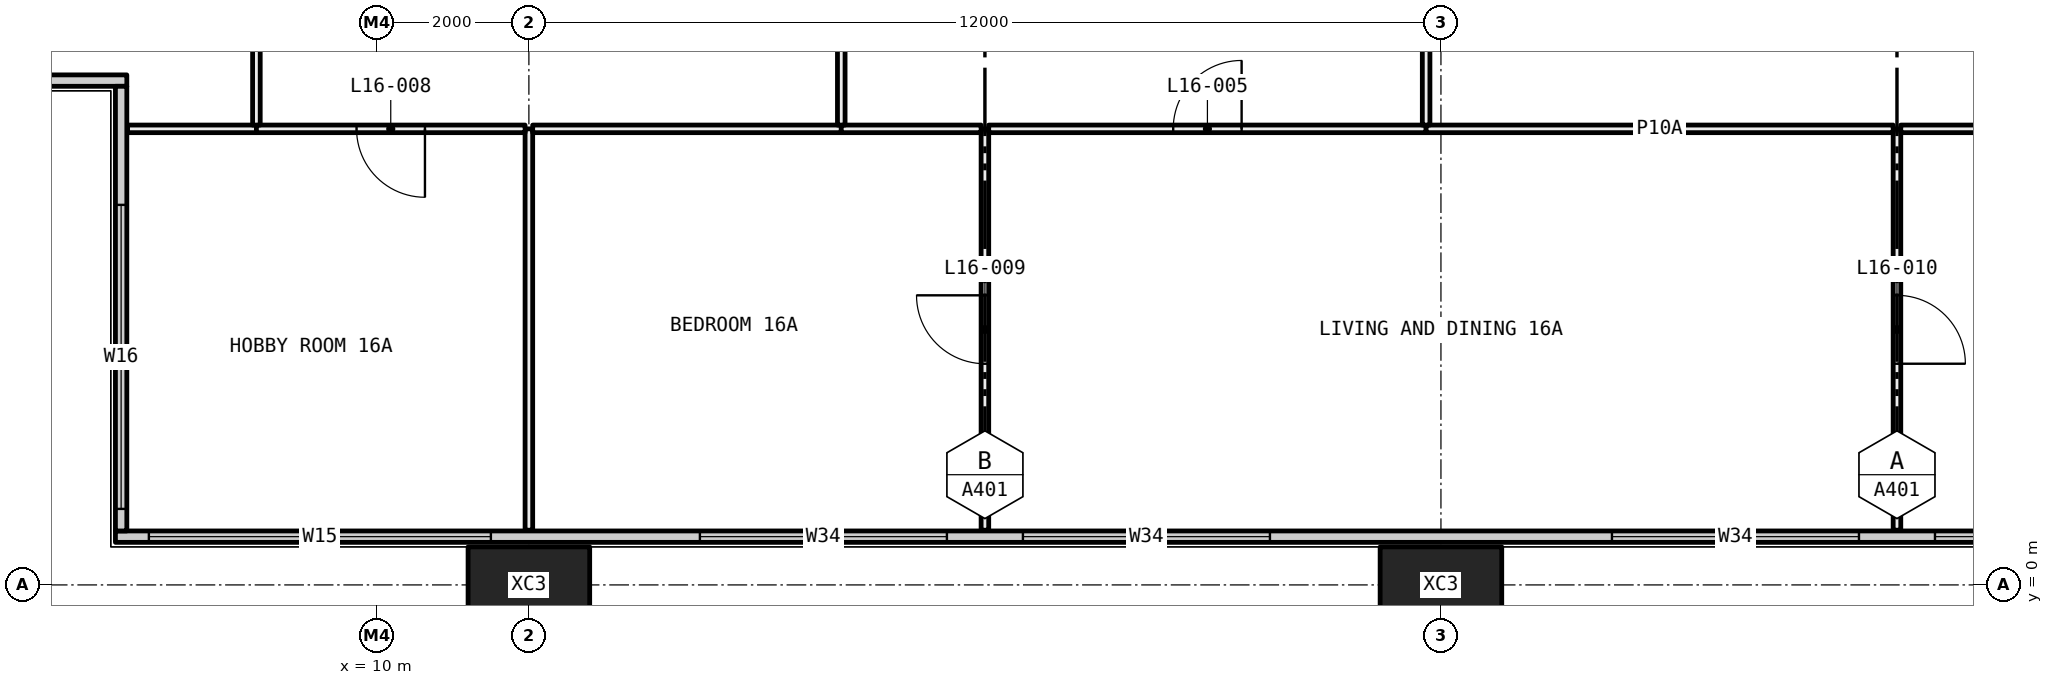
"""IFC4 building model, lengths in metres.
Left out: names, types, materials, properties, quantities, classifications, styles, units other than length and angle.
Written with IfcOpenShell. Run it as: python <this file> out.ifc"""

import sys

from ifc_helpers import new_model, si_unit, direction, frame, frame_2d, origin, origin_2d, place, context, subcontext, project, spatial, rectangle, hollow_rectangle, extrude, element, fill, save


model = new_model("IFC4")
c1 = context("Model", 3, precision=1e-05, world=origin(), true_north=direction((0.0, 1.0)))
c2 = subcontext(c1, "Body", "Model", "MODEL_VIEW")
j1 = project(units=[si_unit("LENGTHUNIT", "METRE"), si_unit("PLANEANGLEUNIT", "RADIAN")], contexts=[c1])
p1 = place(None, origin())
s1 = spatial("IfcSite", under=j1, at=p1, CompositionType="ELEMENT")
p2 = place(p1, origin())
s2 = spatial("IfcBuilding", under=s1, at=p2, CompositionType="ELEMENT")
p3 = place(p2, frame((0.0, 0.0, 67.95)))
s3 = spatial("IfcBuildingStorey", under=s2, at=p3, CompositionType="ELEMENT", Elevation=67.95)
for number, where, z_axis, x_axis in (
    (1, (12.0, 0.0, -0.4), (0.0, 0.0, 1.0), (1.0, 0.0, 0.0)),
    (2, (24.0, 0.0, -0.4), (0.0, 0.0, 1.0), (1.0, 0.0, 0.0)),
):
    element("IfcColumn", number, at=place(p3, frame(where, z_axis=z_axis, x_axis=x_axis)), inside=s3, PredefinedType="COLUMN", context=c2, shape_type="SweptSolid", body=[
        extrude(hollow_rectangle(XDim=1.6, YDim=1.0, WallThickness=0.065, at=origin_2d()), origin(), (0.0, 0.0, 1.0), 3.45),
    ])
p4 = place(p3, frame((6.56, 0.635, 0.0), z_axis=(0.0, 0.0, 1.0), x_axis=(1.0, 0.0, 0.0)))
e3 = element("IfcWall", 3, at=p4, inside=s3, PredefinedType="ELEMENTEDWALL", context=c2, shape_type="SweptSolid", body=[
    extrude(rectangle(XDim=58.88, YDim=0.15, at=frame_2d((29.44, 0.0))), origin(), (0.0, 0.0, 1.0), 3.05),
])
p5 = place(p4, frame((0.44, 0.0, 0.45)))
e4 = element("IfcOpeningElement", 4, at=p5, cuts=e3, PredefinedType="OPENING", context=c2, shape_type="SweptSolid", body=[
    extrude(rectangle(XDim=4.5, YDim=2.55, at=frame_2d((2.25, 1.275))), frame((0.0, 0.085, 0.0), z_axis=(0.0, -1.0, 0.0), x_axis=(1.0, 0.0, 0.0)), (0.0, 0.0, 1.0), 0.17),
])
p6 = place(p4, frame((7.69, 0.0, 0.45)))
e5 = element("IfcOpeningElement", 5, at=p6, cuts=e3, PredefinedType="OPENING", context=c2, shape_type="SweptSolid", body=[
    extrude(rectangle(XDim=3.25, YDim=2.55, at=frame_2d((1.625, 1.275))), frame((0.0, 0.085, 0.0), z_axis=(0.0, -1.0, 0.0), x_axis=(1.0, 0.0, 0.0)), (0.0, 0.0, 1.0), 0.17),
])
p7 = place(p4, frame((11.94, 0.0, 0.45)))
e6 = element("IfcOpeningElement", 6, at=p7, cuts=e3, PredefinedType="OPENING", context=c2, shape_type="SweptSolid", body=[
    extrude(rectangle(XDim=3.25, YDim=2.55, at=frame_2d((1.625, 1.275))), frame((0.0, 0.085, 0.0), z_axis=(0.0, -1.0, 0.0), x_axis=(1.0, 0.0, 0.0)), (0.0, 0.0, 1.0), 0.17),
])
p8 = place(p4, frame((19.69, 0.0, 0.45)))
e7 = element("IfcOpeningElement", 7, at=p8, cuts=e3, PredefinedType="OPENING", context=c2, shape_type="SweptSolid", body=[
    extrude(rectangle(XDim=3.25, YDim=2.55, at=frame_2d((1.625, 1.275))), frame((0.0, 0.085, 0.0), z_axis=(0.0, -1.0, 0.0), x_axis=(1.0, 0.0, 0.0)), (0.0, 0.0, 1.0), 0.17),
])
p9 = place(p4, frame((23.94, 0.0, 0.45)))
e8 = element("IfcOpeningElement", 8, at=p9, cuts=e3, PredefinedType="OPENING", context=c2, shape_type="SweptSolid", body=[
    extrude(rectangle(XDim=2.0, YDim=2.55, at=frame_2d((1.0, 1.275))), frame((0.0, 0.085, 0.0), z_axis=(0.0, -1.0, 0.0), x_axis=(1.0, 0.0, 0.0)), (0.0, 0.0, 1.0), 0.17),
])
p10 = place(p4, frame((31.69, 0.0, 0.45)))
e9 = element("IfcOpeningElement", 9, at=p10, cuts=e3, PredefinedType="OPENING", context=c2, shape_type="SweptSolid", body=[
    extrude(rectangle(XDim=3.25, YDim=2.55, at=frame_2d((1.625, 1.275))), frame((0.0, 0.085, 0.0), z_axis=(0.0, -1.0, 0.0), x_axis=(1.0, 0.0, 0.0)), (0.0, 0.0, 1.0), 0.17),
])
p11 = place(p4, frame((35.94, 0.0, 0.45)))
e10 = element("IfcOpeningElement", 10, at=p11, cuts=e3, PredefinedType="OPENING", context=c2, shape_type="SweptSolid", body=[
    extrude(rectangle(XDim=3.25, YDim=2.55, at=frame_2d((1.625, 1.275))), frame((0.0, 0.085, 0.0), z_axis=(0.0, -1.0, 0.0), x_axis=(1.0, 0.0, 0.0)), (0.0, 0.0, 1.0), 0.17),
])
p12 = place(p4, frame((43.69, 0.0, 0.45)))
e11 = element("IfcOpeningElement", 11, at=p12, cuts=e3, PredefinedType="OPENING", context=c2, shape_type="SweptSolid", body=[
    extrude(rectangle(XDim=3.25, YDim=2.55, at=frame_2d((1.625, 1.275))), frame((0.0, 0.085, 0.0), z_axis=(0.0, -1.0, 0.0), x_axis=(1.0, 0.0, 0.0)), (0.0, 0.0, 1.0), 0.17),
])
p13 = place(p4, frame((47.94, 0.0, 0.45)))
e12 = element("IfcOpeningElement", 12, at=p13, cuts=e3, PredefinedType="OPENING", context=c2, shape_type="SweptSolid", body=[
    extrude(rectangle(XDim=2.0, YDim=2.55, at=frame_2d((1.0, 1.275))), frame((0.0, 0.085, 0.0), z_axis=(0.0, -1.0, 0.0), x_axis=(1.0, 0.0, 0.0)), (0.0, 0.0, 1.0), 0.17),
])
p14 = place(p4, frame((53.94, 0.0, 0.45)))
e13 = element("IfcOpeningElement", 13, at=p14, cuts=e3, PredefinedType="OPENING", context=c2, shape_type="SweptSolid", body=[
    extrude(rectangle(XDim=4.5, YDim=2.55, at=frame_2d((2.25, 1.275))), frame((0.0, 0.085, 0.0), z_axis=(0.0, -1.0, 0.0), x_axis=(1.0, 0.0, 0.0)), (0.0, 0.0, 1.0), 0.17),
])
p15 = place(p3, frame((0.56, 6.635, 0.0), z_axis=(0.0, 0.0, 1.0), x_axis=(1.0, 0.0, 0.0)))
e14 = element("IfcWall", 14, at=p15, inside=s3, PredefinedType="ELEMENTEDWALL", context=c2, shape_type="SweptSolid", body=[
    extrude(rectangle(XDim=6.15, YDim=0.15, at=frame_2d((3.075, 0.0))), origin(), (0.0, 0.0, 1.0), 3.05),
])
p16 = place(p15, frame((0.44, 0.0, 0.45)))
e15 = element("IfcOpeningElement", 15, at=p16, cuts=e14, PredefinedType="OPENING", context=c2, shape_type="SweptSolid", body=[
    extrude(rectangle(XDim=4.0, YDim=2.55, at=frame_2d((2.0, 1.275))), frame((0.0, 0.085, 0.0), z_axis=(0.0, -1.0, 0.0), x_axis=(1.0, 0.0, 0.0)), (0.0, 0.0, 1.0), 0.17),
])
p17 = place(p3, frame((6.635, 0.71, 0.0), z_axis=(0.0, 0.0, 1.0), x_axis=(0.0, 1.0, 0.0)))
e16 = element("IfcWall", 16, at=p17, inside=s3, PredefinedType="ELEMENTEDWALL", context=c2, shape_type="SweptSolid", body=[
    extrude(rectangle(XDim=5.85, YDim=0.15, at=frame_2d((2.925, 0.0))), origin(), (0.0, 0.0, 1.0), 3.05),
])
p18 = place(p17, frame((0.29, 0.0, 0.45)))
e17 = element("IfcOpeningElement", 17, at=p18, cuts=e16, PredefinedType="OPENING", context=c2, shape_type="SweptSolid", body=[
    extrude(rectangle(XDim=4.0, YDim=2.55, at=frame_2d((2.0, 1.275))), frame((0.0, 0.085, 0.0), z_axis=(0.0, -1.0, 0.0), x_axis=(1.0, 0.0, 0.0)), (0.0, 0.0, 1.0), 0.17),
])
p19 = place(p3, frame((12.0, 0.72, 0.0), z_axis=(0.0, 0.0, 1.0), x_axis=(0.0, 1.0, 0.0)))
e18 = element("IfcWall", 18, at=p19, inside=s3, PredefinedType="PARTITIONING", context=c2, shape_type="SweptSolid", body=[
    extrude(rectangle(XDim=5.28, YDim=0.1, at=frame_2d((2.64, 0.0))), origin(), (0.0, 0.0, 1.0), 2.45),
])
p20 = place(p3, frame((8.415, 6.0, 0.0), z_axis=(0.0, 0.0, 1.0), x_axis=(-1.0, 0.0, 0.0)))
e19 = element("IfcWall", 19, at=p20, inside=s3, PredefinedType="PARTITIONING", context=c2, shape_type="SweptSolid", body=[
    extrude(rectangle(XDim=1.695, YDim=0.1, at=frame_2d((0.848, 0.0))), origin(), (0.0, 0.0, 1.0), 3.05),
])
p21 = place(p3, frame((11.95, 6.0, 0.0), z_axis=(0.0, 0.0, 1.0), x_axis=(-1.0, 0.0, 0.0)))
e20 = element("IfcWall", 20, at=p21, inside=s3, PredefinedType="PARTITIONING", context=c2, shape_type="SweptSolid", body=[
    extrude(rectangle(XDim=3.535, YDim=0.1, at=frame_2d((1.768, 0.0))), origin(), (0.0, 0.0, 1.0), 2.45),
])
p22 = place(p21, frame((1.317, 0.0, 0.0)))
e21 = element("IfcOpeningElement", 21, at=p22, cuts=e20, PredefinedType="OPENING", context=c2, shape_type="SweptSolid", body=[
    extrude(rectangle(XDim=0.9, YDim=2.1, at=frame_2d((0.45, 1.05))), frame((0.0, 0.06, 0.0), z_axis=(0.0, -1.0, 0.0), x_axis=(1.0, 0.0, 0.0)), (0.0, 0.0, 1.0), 0.12),
])
p23 = place(p3, frame((18.0, 0.72, 0.0), z_axis=(0.0, 0.0, 1.0), x_axis=(0.0, 1.0, 0.0)))
e22 = element("IfcWall", 22, at=p23, inside=s3, PredefinedType="PARTITIONING", context=c2, shape_type="SweptSolid", body=[
    extrude(rectangle(XDim=5.28, YDim=0.1, at=frame_2d((2.64, 0.0))), origin(), (0.0, 0.0, 1.0), 3.05),
])
p24 = place(p23, frame((2.19, 0.0, 0.0)))
e23 = element("IfcOpeningElement", 23, at=p24, cuts=e22, PredefinedType="OPENING", context=c2, shape_type="SweptSolid", body=[
    extrude(rectangle(XDim=0.9, YDim=2.1, at=frame_2d((0.45, 1.05))), frame((0.0, 0.06, 0.0), z_axis=(0.0, -1.0, 0.0), x_axis=(1.0, 0.0, 0.0)), (0.0, 0.0, 1.0), 0.12),
])
p25 = place(p3, frame((16.11, 6.0, 0.0), z_axis=(0.0, 0.0, 1.0), x_axis=(-1.0, 0.0, 0.0)))
e24 = element("IfcWall", 24, at=p25, inside=s3, PredefinedType="PARTITIONING", context=c2, shape_type="SweptSolid", body=[
    extrude(rectangle(XDim=4.06, YDim=0.1, at=frame_2d((2.03, 0.0))), origin(), (0.0, 0.0, 1.0), 2.45),
])
p26 = place(p3, frame((17.95, 6.0, 0.0), z_axis=(0.0, 0.0, 1.0), x_axis=(-1.0, 0.0, 0.0)))
e25 = element("IfcWall", 25, at=p26, inside=s3, PredefinedType="PARTITIONING", context=c2, shape_type="SweptSolid", body=[
    extrude(rectangle(XDim=1.84, YDim=0.1, at=frame_2d((0.92, 0.0))), origin(), (0.0, 0.0, 1.0), 3.05),
])
p27 = place(p3, frame((30.0, 0.72, 0.0), z_axis=(0.0, 0.0, 1.0), x_axis=(0.0, 1.0, 0.0)))
e26 = element("IfcWall", 26, at=p27, inside=s3, PredefinedType="PARTITIONING", context=c2, shape_type="SweptSolid", body=[
    extrude(rectangle(XDim=5.28, YDim=0.1, at=frame_2d((2.64, 0.0))), origin(), (0.0, 0.0, 1.0), 3.05),
])
p28 = place(p27, frame((2.19, 0.0, 0.0)))
e27 = element("IfcOpeningElement", 27, at=p28, cuts=e26, PredefinedType="OPENING", context=c2, shape_type="SweptSolid", body=[
    extrude(rectangle(XDim=0.9, YDim=2.1, at=frame_2d((0.45, 1.05))), frame((0.0, 0.06, 0.0), z_axis=(0.0, -1.0, 0.0), x_axis=(1.0, 0.0, 0.0)), (0.0, 0.0, 1.0), 0.12),
])
p29 = place(p3, frame((23.805, 6.0, 0.0), z_axis=(0.0, 0.0, 1.0), x_axis=(-1.0, 0.0, 0.0)))
e28 = element("IfcWall", 28, at=p29, inside=s3, PredefinedType="PARTITIONING", context=c2, shape_type="SweptSolid", body=[
    extrude(rectangle(XDim=5.755, YDim=0.1, at=frame_2d((2.877, 0.0))), origin(), (0.0, 0.0, 1.0), 3.05),
])
p30 = place(p29, frame((2.427, 0.0, 0.0)))
e29 = element("IfcOpeningElement", 29, at=p30, cuts=e28, PredefinedType="OPENING", context=c2, shape_type="SweptSolid", body=[
    extrude(rectangle(XDim=0.9, YDim=2.1, at=frame_2d((0.45, 1.05))), frame((0.0, 0.06, 0.0), z_axis=(0.0, -1.0, 0.0), x_axis=(1.0, 0.0, 0.0)), (0.0, 0.0, 1.0), 0.12),
])
p31 = place(p3, frame((29.95, 6.0, 0.0), z_axis=(0.0, 0.0, 1.0), x_axis=(-1.0, 0.0, 0.0)))
e30 = element("IfcWall", 30, at=p31, inside=s3, PredefinedType="PARTITIONING", context=c2, shape_type="SweptSolid", body=[
    extrude(rectangle(XDim=6.145, YDim=0.1, at=frame_2d((3.073, 0.0))), origin(), (0.0, 0.0, 1.0), 2.45),
])
p32 = place(p3, frame((31.425, 6.0, 0.0), z_axis=(0.0, 0.0, 1.0), x_axis=(-1.0, 0.0, 0.0)))
e31 = element("IfcWall", 31, at=p32, inside=s3, PredefinedType="PARTITIONING", context=c2, shape_type="SweptSolid", body=[
    extrude(rectangle(XDim=1.375, YDim=0.1, at=frame_2d((0.688, 0.0))), origin(), (0.0, 0.0, 1.0), 3.05),
])
p33 = place(p3, frame((8.415, 6.05, 0.0), z_axis=(0.0, 0.0, 1.0), x_axis=(0.0, 1.0, 0.0)))
e32 = element("IfcWall", 32, at=p33, inside=s3, PredefinedType="PARTITIONING", context=c2, shape_type="SweptSolid", body=[
    extrude(rectangle(XDim=5.875, YDim=0.1, at=frame_2d((2.938, 0.0))), origin(), (0.0, 0.0, 1.0), 2.45),
])
p34 = place(p33, frame((2.488, 0.0, 0.0)))
e33 = element("IfcOpeningElement", 33, at=p34, cuts=e32, PredefinedType="OPENING", context=c2, shape_type="SweptSolid", body=[
    extrude(rectangle(XDim=0.9, YDim=2.1, at=frame_2d((0.45, 1.05))), frame((0.0, 0.06, 0.0), z_axis=(0.0, -1.0, 0.0), x_axis=(1.0, 0.0, 0.0)), (0.0, 0.0, 1.0), 0.12),
])
p35 = place(p3, frame((16.11, 6.05, 0.0), z_axis=(0.0, 0.0, 1.0), x_axis=(0.0, 1.0, 0.0)))
e34 = element("IfcWall", 34, at=p35, inside=s3, PredefinedType="PARTITIONING", context=c2, shape_type="SweptSolid", body=[
    extrude(rectangle(XDim=5.95, YDim=0.1, at=frame_2d((2.975, 0.0))), origin(), (0.0, 0.0, 1.0), 2.45),
])
p36 = place(p3, frame((23.805, 6.05, 0.0), z_axis=(0.0, 0.0, 1.0), x_axis=(0.0, 1.0, 0.0)))
e35 = element("IfcWall", 35, at=p36, inside=s3, PredefinedType="PARTITIONING", context=c2, shape_type="SweptSolid", body=[
    extrude(rectangle(XDim=5.15, YDim=0.1, at=frame_2d((2.575, 0.0))), origin(), (0.0, 0.0, 1.0), 3.05),
])
p37 = place(p36, frame((2.125, 0.0, 0.0)))
e36 = element("IfcOpeningElement", 36, at=p37, cuts=e35, PredefinedType="OPENING", context=c2, shape_type="SweptSolid", body=[
    extrude(rectangle(XDim=0.9, YDim=2.1, at=frame_2d((0.45, 1.05))), frame((0.0, 0.06, 0.0), z_axis=(0.0, -1.0, 0.0), x_axis=(1.0, 0.0, 0.0)), (0.0, 0.0, 1.0), 0.12),
])
p38 = place(p5, origin())
e37 = element("IfcWindow", 37, at=p38, inside=s3, PartitioningType="SINGLE_PANEL", PredefinedType="WINDOW", context=c2, shape_type="SweptSolid", body=[
    extrude(rectangle(XDim=4.5, YDim=2.55, at=frame_2d((2.25, 1.275))), frame((0.0, 0.03, 0.0), z_axis=(0.0, -1.0, 0.0), x_axis=(1.0, 0.0, 0.0)), (0.0, 0.0, 1.0), 0.06),
])
fill(e4, e37)
p39 = place(p6, origin())
e38 = element("IfcWindow", 38, at=p39, inside=s3, PartitioningType="SINGLE_PANEL", PredefinedType="WINDOW", context=c2, shape_type="SweptSolid", body=[
    extrude(rectangle(XDim=3.25, YDim=2.55, at=frame_2d((1.625, 1.275))), frame((0.0, 0.03, 0.0), z_axis=(0.0, -1.0, 0.0), x_axis=(1.0, 0.0, 0.0)), (0.0, 0.0, 1.0), 0.06),
])
fill(e5, e38)
p40 = place(p7, origin())
e39 = element("IfcWindow", 39, at=p40, inside=s3, PartitioningType="SINGLE_PANEL", PredefinedType="WINDOW", context=c2, shape_type="SweptSolid", body=[
    extrude(rectangle(XDim=3.25, YDim=2.55, at=frame_2d((1.625, 1.275))), frame((0.0, 0.03, 0.0), z_axis=(0.0, -1.0, 0.0), x_axis=(1.0, 0.0, 0.0)), (0.0, 0.0, 1.0), 0.06),
])
fill(e6, e39)
p41 = place(p8, origin())
e40 = element("IfcWindow", 40, at=p41, inside=s3, PartitioningType="SINGLE_PANEL", PredefinedType="WINDOW", context=c2, shape_type="SweptSolid", body=[
    extrude(rectangle(XDim=3.25, YDim=2.55, at=frame_2d((1.625, 1.275))), frame((0.0, 0.03, 0.0), z_axis=(0.0, -1.0, 0.0), x_axis=(1.0, 0.0, 0.0)), (0.0, 0.0, 1.0), 0.06),
])
fill(e7, e40)
p42 = place(p9, origin())
e41 = element("IfcWindow", 41, at=p42, inside=s3, PartitioningType="SINGLE_PANEL", PredefinedType="WINDOW", context=c2, shape_type="SweptSolid", body=[
    extrude(rectangle(XDim=2.0, YDim=2.55, at=frame_2d((1.0, 1.275))), frame((0.0, 0.03, 0.0), z_axis=(0.0, -1.0, 0.0), x_axis=(1.0, 0.0, 0.0)), (0.0, 0.0, 1.0), 0.06),
])
fill(e8, e41)
p43 = place(p18, origin())
e42 = element("IfcWindow", 42, at=p43, inside=s3, PartitioningType="SINGLE_PANEL", PredefinedType="WINDOW", context=c2, shape_type="SweptSolid", body=[
    extrude(rectangle(XDim=4.0, YDim=2.55, at=frame_2d((2.0, 1.275))), frame((0.0, 0.03, 0.0), z_axis=(0.0, -1.0, 0.0), x_axis=(1.0, 0.0, 0.0)), (0.0, 0.0, 1.0), 0.06),
])
fill(e17, e42)
p44 = place(p30, frame((0.9, 0.0, 0.0), x_axis=(-1.0, 0.0, 0.0)))
e43 = element("IfcDoor", 43, at=p44, inside=s3, OperationType="SINGLE_SWING_LEFT", PredefinedType="DOOR", context=c2, shape_type="SweptSolid", body=[
    extrude(rectangle(XDim=0.9, YDim=2.1, at=frame_2d((0.45, 1.05))), frame((0.0, 0.025, 0.0), z_axis=(0.0, -1.0, 0.0), x_axis=(1.0, 0.0, 0.0)), (0.0, 0.0, 1.0), 0.05),
])
fill(e29, e43)
p45 = place(p22, origin())
e44 = element("IfcDoor", 44, at=p45, inside=s3, OperationType="SINGLE_SWING_RIGHT", PredefinedType="DOOR", context=c2, shape_type="SweptSolid", body=[
    extrude(rectangle(XDim=0.9, YDim=2.1, at=frame_2d((0.45, 1.05))), frame((0.0, 0.025, 0.0), z_axis=(0.0, -1.0, 0.0), x_axis=(1.0, 0.0, 0.0)), (0.0, 0.0, 1.0), 0.05),
])
fill(e21, e44)
p46 = place(p24, origin())
e45 = element("IfcDoor", 45, at=p46, inside=s3, OperationType="SINGLE_SWING_LEFT", PredefinedType="DOOR", context=c2, shape_type="SweptSolid", body=[
    extrude(rectangle(XDim=0.9, YDim=2.1, at=frame_2d((0.45, 1.05))), frame((0.0, 0.025, 0.0), z_axis=(0.0, -1.0, 0.0), x_axis=(1.0, 0.0, 0.0)), (0.0, 0.0, 1.0), 0.05),
])
fill(e23, e45)
p47 = place(p28, frame((0.9, 0.0, 0.0), x_axis=(-1.0, 0.0, 0.0)))
e46 = element("IfcDoor", 46, at=p47, inside=s3, OperationType="SINGLE_SWING_LEFT", PredefinedType="DOOR", context=c2, shape_type="SweptSolid", body=[
    extrude(rectangle(XDim=0.9, YDim=2.1, at=frame_2d((0.45, 1.05))), frame((0.0, 0.025, 0.0), z_axis=(0.0, -1.0, 0.0), x_axis=(1.0, 0.0, 0.0)), (0.0, 0.0, 1.0), 0.05),
])
fill(e27, e46)
save(model, sys.argv[1])
